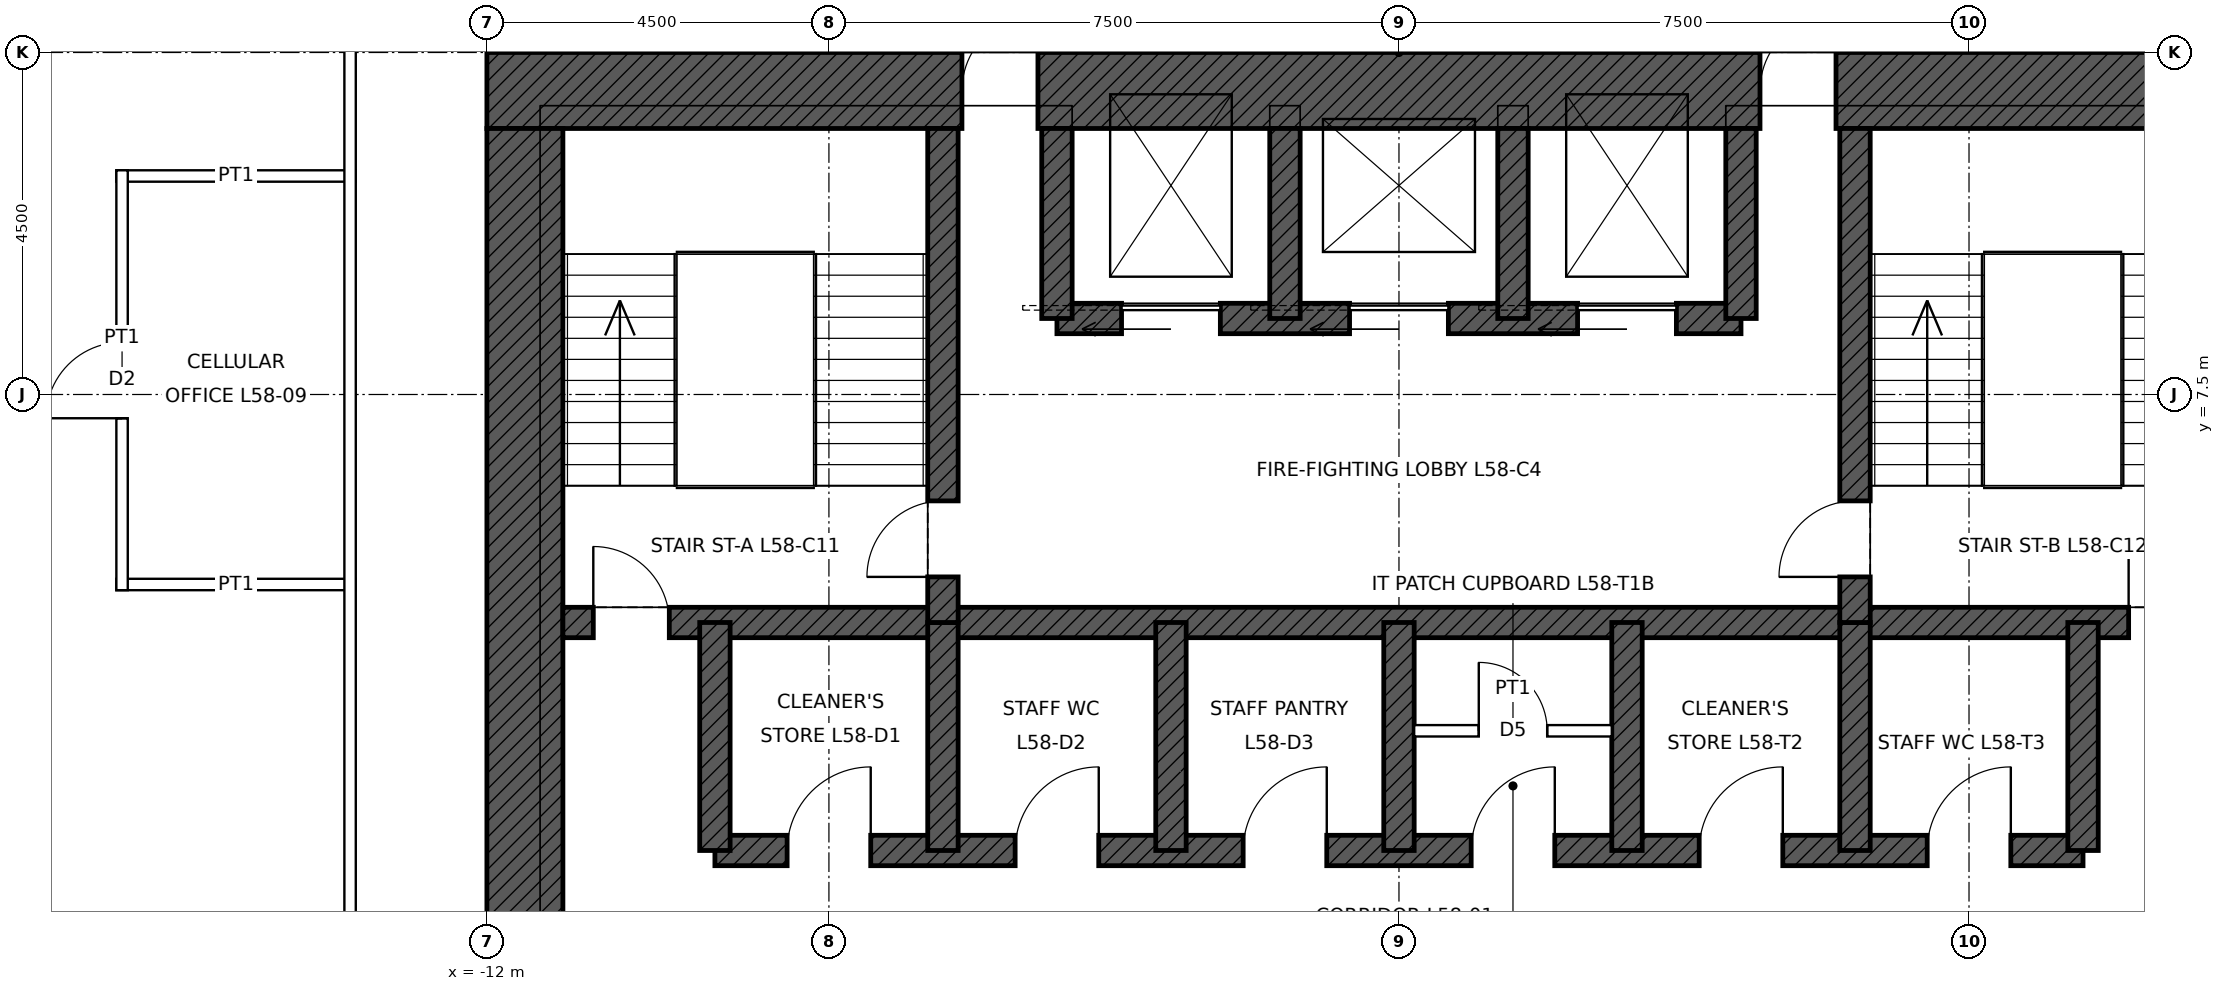
"""IFC4 building model, lengths in metres.
Left out: names, types, materials, properties, quantities, classifications, styles, units other than length and angle.
Written with IfcOpenShell. Run it as: python <this file> out.ifc"""

import sys

from ifc_helpers import new_model, si_unit, direction, frame, frame_2d, origin, place, context, subcontext, project, spatial, rectangle, extrude, element, fill, save


model = new_model("IFC4")
c1 = context("Model", 3, precision=1e-05, world=origin(), true_north=direction((0.0, 1.0)))
c2 = subcontext(c1, "Body", "Model", "MODEL_VIEW")
j1 = project(units=[si_unit("LENGTHUNIT", "METRE"), si_unit("PLANEANGLEUNIT", "RADIAN")], contexts=[c1])
p1 = place(None, origin())
s1 = spatial("IfcSite", under=j1, at=p1, CompositionType="ELEMENT")
p2 = place(p1, origin())
s2 = spatial("IfcBuilding", under=s1, at=p2, CompositionType="ELEMENT")
p3 = place(p2, frame((0.0, 0.0, 267.9)))
s3 = spatial("IfcBuildingStorey", under=s2, at=p3, CompositionType="ELEMENT", Elevation=267.9)
p4 = place(p3, frame((-12.0, 11.5, 0.0), z_axis=(0.0, 0.0, 1.0), x_axis=(1.0, 0.0, 0.0)))
e1 = element("IfcWall", 1, at=p4, inside=s3, PredefinedType="SHEAR", context=c2, shape_type="SweptSolid", body=[
    extrude(rectangle(XDim=24.0, YDim=1.0, at=frame_2d((12.0, 0.0))), origin(), (0.0, 0.0, 1.0), 4.0),
])
p5 = place(p4, frame((6.25, 0.0, 0.0)))
e2 = element("IfcOpeningElement", 2, at=p5, cuts=e1, PredefinedType="OPENING", context=c2, shape_type="SweptSolid", body=[
    extrude(rectangle(XDim=1.0, YDim=2.4, at=frame_2d((0.5, 1.2))), frame((0.0, 0.51, 0.0), z_axis=(0.0, -1.0, 0.0), x_axis=(1.0, 0.0, 0.0)), (0.0, 0.0, 1.0), 1.02),
])
p6 = place(p4, frame((16.75, 0.0, 0.0)))
e3 = element("IfcOpeningElement", 3, at=p6, cuts=e1, PredefinedType="OPENING", context=c2, shape_type="SweptSolid", body=[
    extrude(rectangle(XDim=1.0, YDim=2.4, at=frame_2d((0.5, 1.2))), frame((0.0, 0.51, 0.0), z_axis=(0.0, -1.0, 0.0), x_axis=(1.0, 0.0, 0.0)), (0.0, 0.0, 1.0), 1.02),
])
p7 = place(p3, frame((-11.5, -11.0, 0.0), z_axis=(0.0, 0.0, 1.0), x_axis=(0.0, 1.0, 0.0)))
e4 = element("IfcWall", 4, at=p7, inside=s3, PredefinedType="SHEAR", context=c2, shape_type="SweptSolid", body=[
    extrude(rectangle(XDim=22.0, YDim=1.0, at=frame_2d((11.0, 0.0))), origin(), (0.0, 0.0, 1.0), 4.0),
])
p8 = place(p7, frame((10.5, 0.0, 0.0)))
e5 = element("IfcOpeningElement", 5, at=p8, cuts=e4, PredefinedType="OPENING", context=c2, shape_type="SweptSolid", body=[
    extrude(rectangle(XDim=1.0, YDim=2.4, at=frame_2d((0.5, 1.2))), frame((0.0, 0.51, 0.0), z_axis=(0.0, -1.0, 0.0), x_axis=(1.0, 0.0, 0.0)), (0.0, 0.0, 1.0), 1.02),
])
p9 = place(p3, frame((-11.0, 4.5, 0.0), z_axis=(0.0, 0.0, 1.0), x_axis=(1.0, 0.0, 0.0)))
e6 = element("IfcWall", 6, at=p9, inside=s3, PredefinedType="SHEAR", context=c2, shape_type="SweptSolid", body=[
    extrude(rectangle(XDim=22.0, YDim=0.4, at=frame_2d((11.0, 0.0))), origin(), (0.0, 0.0, 1.0), 4.0),
])
p10 = place(p9, frame((0.4, 0.0, 0.0)))
e7 = element("IfcOpeningElement", 7, at=p10, cuts=e6, PredefinedType="OPENING", context=c2, shape_type="SweptSolid", body=[
    extrude(rectangle(XDim=1.0, YDim=2.1, at=frame_2d((0.5, 1.05))), frame((0.0, 0.21, 0.0), z_axis=(0.0, -1.0, 0.0), x_axis=(1.0, 0.0, 0.0)), (0.0, 0.0, 1.0), 0.42),
])
p11 = place(p9, frame((20.6, 0.0, 0.0)))
e8 = element("IfcOpeningElement", 8, at=p11, cuts=e6, PredefinedType="OPENING", context=c2, shape_type="SweptSolid", body=[
    extrude(rectangle(XDim=1.0, YDim=2.1, at=frame_2d((0.5, 1.05))), frame((0.0, 0.21, 0.0), z_axis=(0.0, -1.0, 0.0), x_axis=(1.0, 0.0, 0.0)), (0.0, 0.0, 1.0), 0.42),
])
p12 = place(p3, frame((-9.0, 1.5, 0.0), z_axis=(0.0, 0.0, 1.0), x_axis=(1.0, 0.0, 0.0)))
e9 = element("IfcWall", 9, at=p12, inside=s3, PredefinedType="SHEAR", context=c2, shape_type="SweptSolid", body=[
    extrude(rectangle(XDim=18.0, YDim=0.4, at=frame_2d((9.0, 0.0))), origin(), (0.0, 0.0, 1.0), 4.0),
])
p13 = place(p12, frame((0.95, 0.0, 0.0)))
e10 = element("IfcOpeningElement", 10, at=p13, cuts=e9, PredefinedType="OPENING", context=c2, shape_type="SweptSolid", body=[
    extrude(rectangle(XDim=1.1, YDim=2.1, at=frame_2d((0.55, 1.05))), frame((0.0, 0.21, 0.0), z_axis=(0.0, -1.0, 0.0), x_axis=(1.0, 0.0, 0.0)), (0.0, 0.0, 1.0), 0.42),
])
p14 = place(p12, frame((3.95, 0.0, 0.0)))
e11 = element("IfcOpeningElement", 11, at=p14, cuts=e9, PredefinedType="OPENING", context=c2, shape_type="SweptSolid", body=[
    extrude(rectangle(XDim=1.1, YDim=2.1, at=frame_2d((0.55, 1.05))), frame((0.0, 0.21, 0.0), z_axis=(0.0, -1.0, 0.0), x_axis=(1.0, 0.0, 0.0)), (0.0, 0.0, 1.0), 0.42),
])
p15 = place(p12, frame((6.95, 0.0, 0.0)))
e12 = element("IfcOpeningElement", 12, at=p15, cuts=e9, PredefinedType="OPENING", context=c2, shape_type="SweptSolid", body=[
    extrude(rectangle(XDim=1.1, YDim=2.1, at=frame_2d((0.55, 1.05))), frame((0.0, 0.21, 0.0), z_axis=(0.0, -1.0, 0.0), x_axis=(1.0, 0.0, 0.0)), (0.0, 0.0, 1.0), 0.42),
])
p16 = place(p12, frame((9.95, 0.0, 0.0)))
e13 = element("IfcOpeningElement", 13, at=p16, cuts=e9, PredefinedType="OPENING", context=c2, shape_type="SweptSolid", body=[
    extrude(rectangle(XDim=1.1, YDim=2.1, at=frame_2d((0.55, 1.05))), frame((0.0, 0.21, 0.0), z_axis=(0.0, -1.0, 0.0), x_axis=(1.0, 0.0, 0.0)), (0.0, 0.0, 1.0), 0.42),
])
p17 = place(p12, frame((12.95, 0.0, 0.0)))
e14 = element("IfcOpeningElement", 14, at=p17, cuts=e9, PredefinedType="OPENING", context=c2, shape_type="SweptSolid", body=[
    extrude(rectangle(XDim=1.1, YDim=2.1, at=frame_2d((0.55, 1.05))), frame((0.0, 0.21, 0.0), z_axis=(0.0, -1.0, 0.0), x_axis=(1.0, 0.0, 0.0)), (0.0, 0.0, 1.0), 0.42),
])
p18 = place(p12, frame((15.95, 0.0, 0.0)))
e15 = element("IfcOpeningElement", 15, at=p18, cuts=e9, PredefinedType="OPENING", context=c2, shape_type="SweptSolid", body=[
    extrude(rectangle(XDim=1.1, YDim=2.1, at=frame_2d((0.55, 1.05))), frame((0.0, 0.21, 0.0), z_axis=(0.0, -1.0, 0.0), x_axis=(1.0, 0.0, 0.0)), (0.0, 0.0, 1.0), 0.42),
])
p19 = place(p3, frame((-4.5, 8.5, 0.0), z_axis=(0.0, 0.0, 1.0), x_axis=(1.0, 0.0, 0.0)))
e16 = element("IfcWall", 16, at=p19, inside=s3, PredefinedType="SHEAR", context=c2, shape_type="SweptSolid", body=[
    extrude(rectangle(XDim=9.0, YDim=0.4, at=frame_2d((4.5, 0.0))), origin(), (0.0, 0.0, 1.0), 4.0),
])
p20 = place(p19, frame((0.85, 0.0, 0.0)))
e17 = element("IfcOpeningElement", 17, at=p20, cuts=e16, PredefinedType="OPENING", context=c2, shape_type="SweptSolid", body=[
    extrude(rectangle(XDim=1.3, YDim=2.4, at=frame_2d((0.65, 1.2))), frame((0.0, 0.21, 0.0), z_axis=(0.0, -1.0, 0.0), x_axis=(1.0, 0.0, 0.0)), (0.0, 0.0, 1.0), 0.42),
])
p21 = place(p19, frame((6.85, 0.0, 0.0)))
e18 = element("IfcOpeningElement", 18, at=p21, cuts=e16, PredefinedType="OPENING", context=c2, shape_type="SweptSolid", body=[
    extrude(rectangle(XDim=1.3, YDim=2.4, at=frame_2d((0.65, 1.2))), frame((0.0, 0.21, 0.0), z_axis=(0.0, -1.0, 0.0), x_axis=(1.0, 0.0, 0.0)), (0.0, 0.0, 1.0), 0.42),
])
p22 = place(p19, frame((3.85, 0.0, 0.0)))
e19 = element("IfcOpeningElement", 19, at=p22, cuts=e16, PredefinedType="OPENING", context=c2, shape_type="SweptSolid", body=[
    extrude(rectangle(XDim=1.3, YDim=2.4, at=frame_2d((0.65, 1.2))), frame((0.0, 0.21, 0.0), z_axis=(0.0, -1.0, 0.0), x_axis=(1.0, 0.0, 0.0)), (0.0, 0.0, 1.0), 0.42),
])
for number, where, z_axis, x_axis in (
    (20, (-9.0, 1.5, 0.0), (0.0, 0.0, 1.0), (0.0, 1.0, 0.0)),
    (21, (9.0, 1.5, 0.0), (0.0, 0.0, 1.0), (0.0, 1.0, 0.0)),
    (22, (-6.0, 1.5, 0.0), (0.0, 0.0, 1.0), (0.0, 1.0, 0.0)),
    (23, (-3.0, 1.5, 0.0), (0.0, 0.0, 1.0), (0.0, 1.0, 0.0)),
    (24, (0.0, 1.5, 0.0), (0.0, 0.0, 1.0), (0.0, 1.0, 0.0)),
    (25, (3.0, 1.5, 0.0), (0.0, 0.0, 1.0), (0.0, 1.0, 0.0)),
    (26, (6.0, 1.5, 0.0), (0.0, 0.0, 1.0), (0.0, 1.0, 0.0)),
):
    element("IfcWall", number, at=place(p3, frame(where, z_axis=z_axis, x_axis=x_axis)), inside=s3, PredefinedType="SHEAR", context=c2, shape_type="SweptSolid", body=[
        extrude(rectangle(XDim=3.0, YDim=0.4, at=frame_2d((1.5, 0.0))), origin(), (0.0, 0.0, 1.0), 4.0),
    ])
p23 = place(p3, frame((-6.0, 4.5, 0.0), z_axis=(0.0, 0.0, 1.0), x_axis=(0.0, 1.0, 0.0)))
e27 = element("IfcWall", 27, at=p23, inside=s3, PredefinedType="SHEAR", context=c2, shape_type="SweptSolid", body=[
    extrude(rectangle(XDim=6.5, YDim=0.4, at=frame_2d((3.25, 0.0))), origin(), (0.0, 0.0, 1.0), 4.0),
])
p24 = place(p23, frame((0.6, 0.0, 0.0)))
e28 = element("IfcOpeningElement", 28, at=p24, cuts=e27, PredefinedType="OPENING", context=c2, shape_type="SweptSolid", body=[
    extrude(rectangle(XDim=1.0, YDim=2.1, at=frame_2d((0.5, 1.05))), frame((0.0, 0.21, 0.0), z_axis=(0.0, -1.0, 0.0), x_axis=(1.0, 0.0, 0.0)), (0.0, 0.0, 1.0), 0.42),
])
p25 = place(p3, frame((6.0, 4.5, 0.0), z_axis=(0.0, 0.0, 1.0), x_axis=(0.0, 1.0, 0.0)))
e29 = element("IfcWall", 29, at=p25, inside=s3, PredefinedType="SHEAR", context=c2, shape_type="SweptSolid", body=[
    extrude(rectangle(XDim=6.5, YDim=0.4, at=frame_2d((3.25, 0.0))), origin(), (0.0, 0.0, 1.0), 4.0),
])
p26 = place(p25, frame((0.6, 0.0, 0.0)))
e30 = element("IfcOpeningElement", 30, at=p26, cuts=e29, PredefinedType="OPENING", context=c2, shape_type="SweptSolid", body=[
    extrude(rectangle(XDim=1.0, YDim=2.1, at=frame_2d((0.5, 1.05))), frame((0.0, 0.21, 0.0), z_axis=(0.0, -1.0, 0.0), x_axis=(1.0, 0.0, 0.0)), (0.0, 0.0, 1.0), 0.42),
])
for number, where, z_axis, x_axis in (
    (31, (-4.5, 8.5, 0.0), (0.0, 0.0, 1.0), (0.0, 1.0, 0.0)),
    (32, (4.5, 8.5, 0.0), (0.0, 0.0, 1.0), (0.0, 1.0, 0.0)),
    (33, (-1.5, 8.5, 0.0), (0.0, 0.0, 1.0), (0.0, 1.0, 0.0)),
    (34, (1.5, 8.5, 0.0), (0.0, 0.0, 1.0), (0.0, 1.0, 0.0)),
):
    element("IfcWall", number, at=place(p3, frame(where, z_axis=z_axis, x_axis=x_axis)), inside=s3, PredefinedType="SHEAR", context=c2, shape_type="SweptSolid", body=[
        extrude(rectangle(XDim=2.5, YDim=0.4, at=frame_2d((1.25, 0.0))), origin(), (0.0, 0.0, 1.0), 4.0),
    ])
for number, where, z_axis, x_axis in (
    (35, (-16.875, 5.0, 0.0), (0.0, 0.0, 1.0), (1.0, 0.0, 0.0)),
    (36, (-16.875, 10.375, 0.0), (0.0, 0.0, 1.0), (1.0, 0.0, 0.0)),
):
    element("IfcWall", number, at=place(p3, frame(where, z_axis=z_axis, x_axis=x_axis)), inside=s3, PredefinedType="PARTITIONING", context=c2, shape_type="SweptSolid", body=[
        extrude(rectangle(XDim=3.15, YDim=0.15, at=frame_2d((1.575, 0.0))), origin(), (0.0, 0.0, 1.0), 3.85),
    ])
p27 = place(p3, frame((-16.8, 4.925, 0.0), z_axis=(0.0, 0.0, 1.0), x_axis=(0.0, 1.0, 0.0)))
e37 = element("IfcWall", 37, at=p27, inside=s3, PredefinedType="PARTITIONING", context=c2, shape_type="SweptSolid", body=[
    extrude(rectangle(XDim=5.525, YDim=0.15, at=frame_2d((2.762, 0.0))), origin(), (0.0, 0.0, 1.0), 3.85),
])
p28 = place(p27, frame((2.262, 0.0, 0.0)))
e38 = element("IfcOpeningElement", 38, at=p28, cuts=e37, PredefinedType="OPENING", context=c2, shape_type="SweptSolid", body=[
    extrude(rectangle(XDim=1.0, YDim=2.1, at=frame_2d((0.5, 1.05))), frame((0.0, 0.085, 0.0), z_axis=(0.0, -1.0, 0.0), x_axis=(1.0, 0.0, 0.0)), (0.0, 0.0, 1.0), 0.17),
])
p29 = place(p3, frame((-13.8, -13.875, 0.0), z_axis=(0.0, 0.0, 1.0), x_axis=(0.0, 1.0, 0.0)))
e39 = element("IfcWall", 39, at=p29, inside=s3, PredefinedType="PARTITIONING", context=c2, shape_type="SweptSolid", body=[
    extrude(rectangle(XDim=27.75, YDim=0.15, at=frame_2d((13.875, 0.0))), origin(), (0.0, 0.0, 1.0), 3.85),
])
p30 = place(p3, frame((0.2, 3.075, 0.0), z_axis=(0.0, 0.0, 1.0), x_axis=(1.0, 0.0, 0.0)))
e40 = element("IfcWall", 40, at=p30, inside=s3, PredefinedType="PARTITIONING", context=c2, shape_type="SweptSolid", body=[
    extrude(rectangle(XDim=2.6, YDim=0.15, at=frame_2d((1.3, 0.0))), origin(), (0.0, 0.0, 1.0), 3.75),
])
p31 = place(p30, frame((0.85, 0.0, 0.0)))
e41 = element("IfcOpeningElement", 41, at=p31, cuts=e40, PredefinedType="OPENING", context=c2, shape_type="SweptSolid", body=[
    extrude(rectangle(XDim=0.9, YDim=2.1, at=frame_2d((0.45, 1.05))), frame((0.0, 0.085, 0.0), z_axis=(0.0, -1.0, 0.0), x_axis=(1.0, 0.0, 0.0)), (0.0, 0.0, 1.0), 0.17),
])
p32 = place(p10, origin())
e42 = element("IfcDoor", 42, at=p32, inside=s3, OperationType="SINGLE_SWING_LEFT", PredefinedType="DOOR", context=c2, shape_type="SweptSolid", body=[
    extrude(rectangle(XDim=1.0, YDim=2.1, at=frame_2d((0.5, 1.05))), frame((0.0, 0.025, 0.0), z_axis=(0.0, -1.0, 0.0), x_axis=(1.0, 0.0, 0.0)), (0.0, 0.0, 1.0), 0.05),
])
fill(e7, e42)
p33 = place(p11, origin())
e43 = element("IfcDoor", 43, at=p33, inside=s3, OperationType="SINGLE_SWING_LEFT", PredefinedType="DOOR", context=c2, shape_type="SweptSolid", body=[
    extrude(rectangle(XDim=1.0, YDim=2.1, at=frame_2d((0.5, 1.05))), frame((0.0, 0.025, 0.0), z_axis=(0.0, -1.0, 0.0), x_axis=(1.0, 0.0, 0.0)), (0.0, 0.0, 1.0), 0.05),
])
fill(e8, e43)
p34 = place(p24, origin())
e44 = element("IfcDoor", 44, at=p34, inside=s3, OperationType="SINGLE_SWING_LEFT", PredefinedType="DOOR", context=c2, shape_type="SweptSolid", body=[
    extrude(rectangle(XDim=1.0, YDim=2.1, at=frame_2d((0.5, 1.05))), frame((0.0, 0.025, 0.0), z_axis=(0.0, -1.0, 0.0), x_axis=(1.0, 0.0, 0.0)), (0.0, 0.0, 1.0), 0.05),
])
fill(e28, e44)
p35 = place(p26, origin())
e45 = element("IfcDoor", 45, at=p35, inside=s3, OperationType="SINGLE_SWING_LEFT", PredefinedType="DOOR", context=c2, shape_type="SweptSolid", body=[
    extrude(rectangle(XDim=1.0, YDim=2.1, at=frame_2d((0.5, 1.05))), frame((0.0, 0.025, 0.0), z_axis=(0.0, -1.0, 0.0), x_axis=(1.0, 0.0, 0.0)), (0.0, 0.0, 1.0), 0.05),
])
fill(e30, e45)
p36 = place(p5, origin())
e46 = element("IfcDoor", 46, at=p36, inside=s3, OperationType="SINGLE_SWING_RIGHT", PredefinedType="DOOR", context=c2, shape_type="SweptSolid", body=[
    extrude(rectangle(XDim=1.0, YDim=2.4, at=frame_2d((0.5, 1.2))), frame((0.0, 0.485, 0.0), z_axis=(0.0, -1.0, 0.0), x_axis=(1.0, 0.0, 0.0)), (0.0, 0.0, 1.0), 0.05),
])
fill(e2, e46)
p37 = place(p6, origin())
e47 = element("IfcDoor", 47, at=p37, inside=s3, OperationType="SINGLE_SWING_RIGHT", PredefinedType="DOOR", context=c2, shape_type="SweptSolid", body=[
    extrude(rectangle(XDim=1.0, YDim=2.4, at=frame_2d((0.5, 1.2))), frame((0.0, 0.485, 0.0), z_axis=(0.0, -1.0, 0.0), x_axis=(1.0, 0.0, 0.0)), (0.0, 0.0, 1.0), 0.05),
])
fill(e3, e47)
p38 = place(p20, origin())
e48 = element("IfcDoor", 48, at=p38, inside=s3, OperationType="SLIDING_TO_LEFT", PredefinedType="DOOR", context=c2, shape_type="SweptSolid", body=[
    extrude(rectangle(XDim=1.3, YDim=2.4, at=frame_2d((0.65, 1.2))), frame((0.0, 0.025, 0.0), z_axis=(0.0, -1.0, 0.0), x_axis=(1.0, 0.0, 0.0)), (0.0, 0.0, 1.0), 0.05),
])
fill(e17, e48)
p39 = place(p21, origin())
e49 = element("IfcDoor", 49, at=p39, inside=s3, OperationType="SLIDING_TO_LEFT", PredefinedType="DOOR", context=c2, shape_type="SweptSolid", body=[
    extrude(rectangle(XDim=1.3, YDim=2.4, at=frame_2d((0.65, 1.2))), frame((0.0, 0.025, 0.0), z_axis=(0.0, -1.0, 0.0), x_axis=(1.0, 0.0, 0.0)), (0.0, 0.0, 1.0), 0.05),
])
fill(e18, e49)
p40 = place(p22, origin())
e50 = element("IfcDoor", 50, at=p40, inside=s3, OperationType="SLIDING_TO_LEFT", PredefinedType="DOOR", context=c2, shape_type="SweptSolid", body=[
    extrude(rectangle(XDim=1.3, YDim=2.4, at=frame_2d((0.65, 1.2))), frame((0.0, 0.025, 0.0), z_axis=(0.0, -1.0, 0.0), x_axis=(1.0, 0.0, 0.0)), (0.0, 0.0, 1.0), 0.05),
])
fill(e19, e50)
p41 = place(p13, origin())
e51 = element("IfcDoor", 51, at=p41, inside=s3, OperationType="SINGLE_SWING_RIGHT", PredefinedType="DOOR", context=c2, shape_type="SweptSolid", body=[
    extrude(rectangle(XDim=1.1, YDim=2.1, at=frame_2d((0.55, 1.05))), frame((0.0, 0.025, 0.0), z_axis=(0.0, -1.0, 0.0), x_axis=(1.0, 0.0, 0.0)), (0.0, 0.0, 1.0), 0.05),
])
fill(e10, e51)
p42 = place(p14, origin())
e52 = element("IfcDoor", 52, at=p42, inside=s3, OperationType="SINGLE_SWING_RIGHT", PredefinedType="DOOR", context=c2, shape_type="SweptSolid", body=[
    extrude(rectangle(XDim=1.1, YDim=2.1, at=frame_2d((0.55, 1.05))), frame((0.0, 0.025, 0.0), z_axis=(0.0, -1.0, 0.0), x_axis=(1.0, 0.0, 0.0)), (0.0, 0.0, 1.0), 0.05),
])
fill(e11, e52)
p43 = place(p15, origin())
e53 = element("IfcDoor", 53, at=p43, inside=s3, OperationType="SINGLE_SWING_RIGHT", PredefinedType="DOOR", context=c2, shape_type="SweptSolid", body=[
    extrude(rectangle(XDim=1.1, YDim=2.1, at=frame_2d((0.55, 1.05))), frame((0.0, 0.025, 0.0), z_axis=(0.0, -1.0, 0.0), x_axis=(1.0, 0.0, 0.0)), (0.0, 0.0, 1.0), 0.05),
])
fill(e12, e53)
p44 = place(p16, origin())
e54 = element("IfcDoor", 54, at=p44, inside=s3, OperationType="SINGLE_SWING_RIGHT", PredefinedType="DOOR", context=c2, shape_type="SweptSolid", body=[
    extrude(rectangle(XDim=1.1, YDim=2.1, at=frame_2d((0.55, 1.05))), frame((0.0, 0.025, 0.0), z_axis=(0.0, -1.0, 0.0), x_axis=(1.0, 0.0, 0.0)), (0.0, 0.0, 1.0), 0.05),
])
fill(e13, e54)
p45 = place(p31, origin())
e55 = element("IfcDoor", 55, at=p45, inside=s3, OperationType="SINGLE_SWING_LEFT", PredefinedType="DOOR", context=c2, shape_type="SweptSolid", body=[
    extrude(rectangle(XDim=0.9, YDim=2.1, at=frame_2d((0.45, 1.05))), frame((0.0, 0.025, 0.0), z_axis=(0.0, -1.0, 0.0), x_axis=(1.0, 0.0, 0.0)), (0.0, 0.0, 1.0), 0.05),
])
fill(e41, e55)
p46 = place(p17, origin())
e56 = element("IfcDoor", 56, at=p46, inside=s3, OperationType="SINGLE_SWING_RIGHT", PredefinedType="DOOR", context=c2, shape_type="SweptSolid", body=[
    extrude(rectangle(XDim=1.1, YDim=2.1, at=frame_2d((0.55, 1.05))), frame((0.0, 0.025, 0.0), z_axis=(0.0, -1.0, 0.0), x_axis=(1.0, 0.0, 0.0)), (0.0, 0.0, 1.0), 0.05),
])
fill(e14, e56)
p47 = place(p18, origin())
e57 = element("IfcDoor", 57, at=p47, inside=s3, OperationType="SINGLE_SWING_RIGHT", PredefinedType="DOOR", context=c2, shape_type="SweptSolid", body=[
    extrude(rectangle(XDim=1.1, YDim=2.1, at=frame_2d((0.55, 1.05))), frame((0.0, 0.025, 0.0), z_axis=(0.0, -1.0, 0.0), x_axis=(1.0, 0.0, 0.0)), (0.0, 0.0, 1.0), 0.05),
])
fill(e15, e57)
p48 = place(p28, origin())
e58 = element("IfcDoor", 58, at=p48, inside=s3, OperationType="SINGLE_SWING_LEFT", PredefinedType="DOOR", context=c2, shape_type="SweptSolid", body=[
    extrude(rectangle(XDim=1.0, YDim=2.1, at=frame_2d((0.5, 1.05))), frame((0.0, 0.025, 0.0), z_axis=(0.0, -1.0, 0.0), x_axis=(1.0, 0.0, 0.0)), (0.0, 0.0, 1.0), 0.05),
])
fill(e38, e58)
save(model, sys.argv[1])
